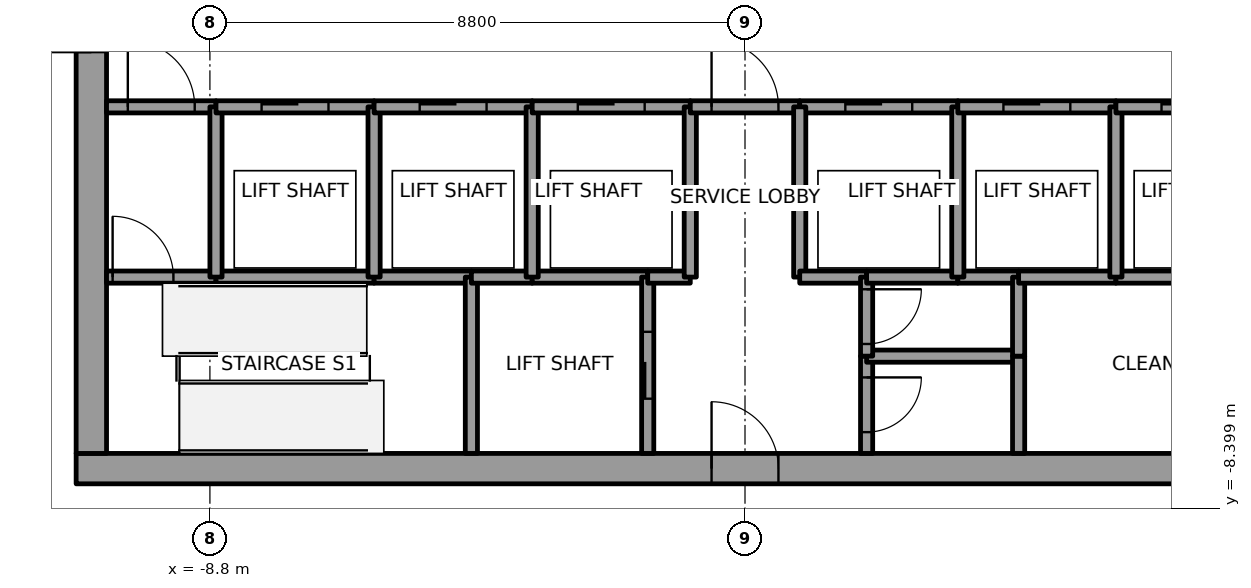
"""IFC4 building model, lengths in metres.
Left out: names, types, materials, properties, quantities, classifications, styles, units other than length and angle.
Written with IfcOpenShell. Run it as: python <this file> out.ifc"""

import sys

from ifc_helpers import new_model, si_unit, direction, frame, frame_2d, origin, place, context, subcontext, project, spatial, rectangle, extrude, element, fill, save


model = new_model("IFC4")
c1 = context("Model", 3, precision=1e-05, world=origin(), true_north=direction((0.0, 1.0)))
c2 = subcontext(c1, "Body", "Model", "MODEL_VIEW")
j1 = project(units=[si_unit("LENGTHUNIT", "METRE"), si_unit("PLANEANGLEUNIT", "RADIAN")], contexts=[c1])
p1 = place(None, origin())
s1 = spatial("IfcSite", under=j1, at=p1, CompositionType="ELEMENT")
p2 = place(p1, origin())
s2 = spatial("IfcBuilding", under=s1, at=p2, CompositionType="ELEMENT")
p3 = place(p2, frame((0.0, 0.0, 275.0)))
s3 = spatial("IfcBuildingStorey", under=s2, at=p3, CompositionType="ELEMENT", Elevation=275.0)
p4 = place(p3, frame((-11.0, -7.75, 0.0), z_axis=(0.0, 0.0, 1.0), x_axis=(1.0, 0.0, 0.0)))
e1 = element("IfcWall", 1, at=p4, inside=s3, PredefinedType="SHEAR", context=c2, shape_type="SweptSolid", body=[
    extrude(rectangle(XDim=22.0, YDim=0.5, at=frame_2d((11.0, 0.0))), origin(), (0.0, 0.0, 1.0), 4.0),
])
p5 = place(p4, frame((10.45, 0.0, 0.0)))
e2 = element("IfcOpeningElement", 2, at=p5, cuts=e1, PredefinedType="OPENING", context=c2, shape_type="SweptSolid", body=[
    extrude(rectangle(XDim=1.1, YDim=2.1, at=frame_2d((0.55, 1.05))), frame((0.0, 0.25, 0.0), z_axis=(0.0, -1.0, 0.0), x_axis=(1.0, 0.0, 0.0)), (0.0, 0.0, 1.0), 0.5),
])
p6 = place(p3, frame((-10.75, -7.5, 0.0), z_axis=(0.0, 0.0, 1.0), x_axis=(0.0, 1.0, 0.0)))
e3 = element("IfcWall", 3, at=p6, inside=s3, PredefinedType="SHEAR", context=c2, shape_type="SweptSolid", body=[
    extrude(rectangle(XDim=15.0, YDim=0.5, at=frame_2d((7.5, 0.0))), origin(), (0.0, 0.0, 1.0), 4.0),
])
p7 = place(p6, frame((6.6, 0.0, 0.0)))
e4 = element("IfcOpeningElement", 4, at=p7, cuts=e3, PredefinedType="OPENING", context=c2, shape_type="SweptSolid", body=[
    extrude(rectangle(XDim=1.8, YDim=2.1, at=frame_2d((0.9, 1.05))), frame((0.0, 0.25, 0.0), z_axis=(0.0, -1.0, 0.0), x_axis=(1.0, 0.0, 0.0)), (0.0, 0.0, 1.0), 0.5),
])
p8 = place(p3, frame((-10.5, -4.6, 0.0), z_axis=(0.0, 0.0, 1.0), x_axis=(1.0, 0.0, 0.0)))
e5 = element("IfcWall", 5, at=p8, inside=s3, PredefinedType="SOLIDWALL", context=c2, shape_type="SweptSolid", body=[
    extrude(rectangle(XDim=1.8, YDim=0.2, at=frame_2d((0.9, 0.0))), origin(), (0.0, 0.0, 1.0), 3.85),
])
p9 = place(p8, frame((0.1, 0.0, 0.0)))
e6 = element("IfcOpeningElement", 6, at=p9, cuts=e5, PredefinedType="OPENING", context=c2, shape_type="SweptSolid", body=[
    extrude(rectangle(XDim=1.0, YDim=2.1, at=frame_2d((0.5, 1.05))), frame((0.0, 0.1, 0.0), z_axis=(0.0, -1.0, 0.0), x_axis=(1.0, 0.0, 0.0)), (0.0, 0.0, 1.0), 0.2),
])
p10 = place(p3, frame((-10.5, -1.8, 0.0), z_axis=(0.0, 0.0, 1.0), x_axis=(1.0, 0.0, 0.0)))
e7 = element("IfcWall", 7, at=p10, inside=s3, PredefinedType="SOLIDWALL", context=c2, shape_type="SweptSolid", body=[
    extrude(rectangle(XDim=1.8, YDim=0.2, at=frame_2d((0.9, 0.0))), origin(), (0.0, 0.0, 1.0), 3.85),
])
p11 = place(p10, frame((0.35, 0.0, 0.0)))
e8 = element("IfcOpeningElement", 8, at=p11, cuts=e7, PredefinedType="OPENING", context=c2, shape_type="SweptSolid", body=[
    extrude(rectangle(XDim=1.1, YDim=2.1, at=frame_2d((0.55, 1.05))), frame((0.0, 0.1, 0.0), z_axis=(0.0, -1.0, 0.0), x_axis=(1.0, 0.0, 0.0)), (0.0, 0.0, 1.0), 0.2),
])
p12 = place(p3, frame((-8.7, -4.6, 0.0), z_axis=(0.0, 0.0, 1.0), x_axis=(1.0, 0.0, 0.0)))
e9 = element("IfcWall", 9, at=p12, inside=s3, PredefinedType="SOLIDWALL", context=c2, shape_type="SweptSolid", body=[
    extrude(rectangle(XDim=2.6, YDim=0.2, at=frame_2d((1.3, 0.0))), origin(), (0.0, 0.0, 1.0), 3.85),
])
p13 = place(p3, frame((-8.7, -4.6, 0.0), z_axis=(0.0, 0.0, 1.0), x_axis=(0.0, 1.0, 0.0)))
e10 = element("IfcWall", 10, at=p13, inside=s3, PredefinedType="SOLIDWALL", context=c2, shape_type="SweptSolid", body=[
    extrude(rectangle(XDim=2.8, YDim=0.2, at=frame_2d((1.4, 0.0))), origin(), (0.0, 0.0, 1.0), 3.85),
])
p14 = place(p3, frame((-8.7, -1.8, 0.0), z_axis=(0.0, 0.0, 1.0), x_axis=(1.0, 0.0, 0.0)))
e11 = element("IfcWall", 11, at=p14, inside=s3, PredefinedType="SOLIDWALL", context=c2, shape_type="SweptSolid", body=[
    extrude(rectangle(XDim=2.6, YDim=0.2, at=frame_2d((1.3, 0.0))), origin(), (0.0, 0.0, 1.0), 3.85),
])
p15 = place(p14, frame((0.75, 0.0, 0.0)))
e12 = element("IfcOpeningElement", 12, at=p15, cuts=e11, PredefinedType="OPENING", context=c2, shape_type="SweptSolid", body=[
    extrude(rectangle(XDim=1.1, YDim=2.1, at=frame_2d((0.55, 1.05))), frame((0.0, 0.1, 0.0), z_axis=(0.0, -1.0, 0.0), x_axis=(1.0, 0.0, 0.0)), (0.0, 0.0, 1.0), 0.2),
])
p16 = place(p3, frame((-6.1, -4.6, 0.0), z_axis=(0.0, 0.0, 1.0), x_axis=(1.0, 0.0, 0.0)))
e13 = element("IfcWall", 13, at=p16, inside=s3, PredefinedType="SOLIDWALL", context=c2, shape_type="SweptSolid", body=[
    extrude(rectangle(XDim=1.6, YDim=0.2, at=frame_2d((0.8, 0.0))), origin(), (0.0, 0.0, 1.0), 3.85),
])
p17 = place(p3, frame((-6.1, -4.6, 0.0), z_axis=(0.0, 0.0, 1.0), x_axis=(0.0, 1.0, 0.0)))
e14 = element("IfcWall", 14, at=p17, inside=s3, PredefinedType="SOLIDWALL", context=c2, shape_type="SweptSolid", body=[
    extrude(rectangle(XDim=2.8, YDim=0.2, at=frame_2d((1.4, 0.0))), origin(), (0.0, 0.0, 1.0), 3.85),
])
p18 = place(p3, frame((-6.1, -1.8, 0.0), z_axis=(0.0, 0.0, 1.0), x_axis=(1.0, 0.0, 0.0)))
e15 = element("IfcWall", 15, at=p18, inside=s3, PredefinedType="SOLIDWALL", context=c2, shape_type="SweptSolid", body=[
    extrude(rectangle(XDim=2.6, YDim=0.2, at=frame_2d((1.3, 0.0))), origin(), (0.0, 0.0, 1.0), 3.85),
])
p19 = place(p18, frame((0.75, 0.0, 0.0)))
e16 = element("IfcOpeningElement", 16, at=p19, cuts=e15, PredefinedType="OPENING", context=c2, shape_type="SweptSolid", body=[
    extrude(rectangle(XDim=1.1, YDim=2.1, at=frame_2d((0.55, 1.05))), frame((0.0, 0.1, 0.0), z_axis=(0.0, -1.0, 0.0), x_axis=(1.0, 0.0, 0.0)), (0.0, 0.0, 1.0), 0.2),
])
p20 = place(p3, frame((-4.5, -4.6, 0.0), z_axis=(0.0, 0.0, 1.0), x_axis=(0.0, -1.0, 0.0)))
e17 = element("IfcWall", 17, at=p20, inside=s3, PredefinedType="SOLIDWALL", context=c2, shape_type="SweptSolid", body=[
    extrude(rectangle(XDim=2.9, YDim=0.2, at=frame_2d((1.45, 0.0))), origin(), (0.0, 0.0, 1.0), 3.85),
])
p21 = place(p3, frame((-4.5, -4.6, 0.0), z_axis=(0.0, 0.0, 1.0), x_axis=(1.0, 0.0, 0.0)))
e18 = element("IfcWall", 18, at=p21, inside=s3, PredefinedType="SOLIDWALL", context=c2, shape_type="SweptSolid", body=[
    extrude(rectangle(XDim=1.0, YDim=0.2, at=frame_2d((0.5, 0.0))), origin(), (0.0, 0.0, 1.0), 3.85),
])
p22 = place(p3, frame((-3.5, -4.6, 0.0), z_axis=(0.0, 0.0, 1.0), x_axis=(1.0, 0.0, 0.0)))
e19 = element("IfcWall", 19, at=p22, inside=s3, PredefinedType="SOLIDWALL", context=c2, shape_type="SweptSolid", body=[
    extrude(rectangle(XDim=1.9, YDim=0.2, at=frame_2d((0.95, 0.0))), origin(), (0.0, 0.0, 1.0), 3.85),
])
p23 = place(p3, frame((-3.5, -4.6, 0.0), z_axis=(0.0, 0.0, 1.0), x_axis=(0.0, 1.0, 0.0)))
e20 = element("IfcWall", 20, at=p23, inside=s3, PredefinedType="SOLIDWALL", context=c2, shape_type="SweptSolid", body=[
    extrude(rectangle(XDim=2.8, YDim=0.2, at=frame_2d((1.4, 0.0))), origin(), (0.0, 0.0, 1.0), 3.85),
])
p24 = place(p3, frame((-3.5, -1.8, 0.0), z_axis=(0.0, 0.0, 1.0), x_axis=(1.0, 0.0, 0.0)))
e21 = element("IfcWall", 21, at=p24, inside=s3, PredefinedType="SOLIDWALL", context=c2, shape_type="SweptSolid", body=[
    extrude(rectangle(XDim=2.6, YDim=0.2, at=frame_2d((1.3, 0.0))), origin(), (0.0, 0.0, 1.0), 3.85),
])
p25 = place(p24, frame((0.75, 0.0, 0.0)))
e22 = element("IfcOpeningElement", 22, at=p25, cuts=e21, PredefinedType="OPENING", context=c2, shape_type="SweptSolid", body=[
    extrude(rectangle(XDim=1.1, YDim=2.1, at=frame_2d((0.55, 1.05))), frame((0.0, 0.1, 0.0), z_axis=(0.0, -1.0, 0.0), x_axis=(1.0, 0.0, 0.0)), (0.0, 0.0, 1.0), 0.2),
])
p26 = place(p3, frame((-1.6, -7.5, 0.0), z_axis=(0.0, 0.0, 1.0), x_axis=(0.0, 1.0, 0.0)))
e23 = element("IfcWall", 23, at=p26, inside=s3, PredefinedType="SOLIDWALL", context=c2, shape_type="SweptSolid", body=[
    extrude(rectangle(XDim=2.9, YDim=0.2, at=frame_2d((1.45, 0.0))), origin(), (0.0, 0.0, 1.0), 3.85),
])
p27 = place(p26, frame((0.9, 0.0, 0.0)))
e24 = element("IfcOpeningElement", 24, at=p27, cuts=e23, PredefinedType="OPENING", context=c2, shape_type="SweptSolid", body=[
    extrude(rectangle(XDim=1.1, YDim=2.1, at=frame_2d((0.55, 1.05))), frame((0.0, 0.1, 0.0), z_axis=(0.0, -1.0, 0.0), x_axis=(1.0, 0.0, 0.0)), (0.0, 0.0, 1.0), 0.2),
])
p28 = place(p3, frame((-1.6, -4.6, 0.0), z_axis=(0.0, 0.0, 1.0), x_axis=(1.0, 0.0, 0.0)))
e25 = element("IfcWall", 25, at=p28, inside=s3, PredefinedType="SOLIDWALL", context=c2, shape_type="SweptSolid", body=[
    extrude(rectangle(XDim=0.7, YDim=0.2, at=frame_2d((0.35, 0.0))), origin(), (0.0, 0.0, 1.0), 3.85),
])
p29 = place(p3, frame((-0.9, -4.6, 0.0), z_axis=(0.0, 0.0, 1.0), x_axis=(0.0, 1.0, 0.0)))
e26 = element("IfcWall", 26, at=p29, inside=s3, PredefinedType="SOLIDWALL", context=c2, shape_type="SweptSolid", body=[
    extrude(rectangle(XDim=2.8, YDim=0.2, at=frame_2d((1.4, 0.0))), origin(), (0.0, 0.0, 1.0), 3.85),
])
p30 = place(p3, frame((-0.9, -1.8, 0.0), z_axis=(0.0, 0.0, 1.0), x_axis=(1.0, 0.0, 0.0)))
e27 = element("IfcWall", 27, at=p30, inside=s3, PredefinedType="SOLIDWALL", context=c2, shape_type="SweptSolid", body=[
    extrude(rectangle(XDim=1.8, YDim=0.2, at=frame_2d((0.9, 0.0))), origin(), (0.0, 0.0, 1.0), 3.85),
])
p31 = place(p30, frame((0.35, 0.0, 0.0)))
e28 = element("IfcOpeningElement", 28, at=p31, cuts=e27, PredefinedType="OPENING", context=c2, shape_type="SweptSolid", body=[
    extrude(rectangle(XDim=1.1, YDim=2.1, at=frame_2d((0.55, 1.05))), frame((0.0, 0.1, 0.0), z_axis=(0.0, -1.0, 0.0), x_axis=(1.0, 0.0, 0.0)), (0.0, 0.0, 1.0), 0.2),
])
p32 = place(p3, frame((0.9, -1.8, 0.0), z_axis=(0.0, 0.0, 1.0), x_axis=(1.0, 0.0, 0.0)))
e29 = element("IfcWall", 29, at=p32, inside=s3, PredefinedType="SOLIDWALL", context=c2, shape_type="SweptSolid", body=[
    extrude(rectangle(XDim=2.6, YDim=0.2, at=frame_2d((1.3, 0.0))), origin(), (0.0, 0.0, 1.0), 3.85),
])
p33 = place(p32, frame((0.75, 0.0, 0.0)))
e30 = element("IfcOpeningElement", 30, at=p33, cuts=e29, PredefinedType="OPENING", context=c2, shape_type="SweptSolid", body=[
    extrude(rectangle(XDim=1.1, YDim=2.1, at=frame_2d((0.55, 1.05))), frame((0.0, 0.1, 0.0), z_axis=(0.0, -1.0, 0.0), x_axis=(1.0, 0.0, 0.0)), (0.0, 0.0, 1.0), 0.2),
])
p34 = place(p3, frame((0.9, -1.8, 0.0), z_axis=(0.0, 0.0, 1.0), x_axis=(0.0, -1.0, 0.0)))
e31 = element("IfcWall", 31, at=p34, inside=s3, PredefinedType="SOLIDWALL", context=c2, shape_type="SweptSolid", body=[
    extrude(rectangle(XDim=2.8, YDim=0.2, at=frame_2d((1.4, 0.0))), origin(), (0.0, 0.0, 1.0), 3.85),
])
p35 = place(p3, frame((0.9, -4.6, 0.0), z_axis=(0.0, 0.0, 1.0), x_axis=(1.0, 0.0, 0.0)))
e32 = element("IfcWall", 32, at=p35, inside=s3, PredefinedType="SOLIDWALL", context=c2, shape_type="SweptSolid", body=[
    extrude(rectangle(XDim=1.1, YDim=0.2, at=frame_2d((0.55, 0.0))), origin(), (0.0, 0.0, 1.0), 3.85),
])
p36 = place(p3, frame((2.0, -5.9, 0.0), z_axis=(0.0, 0.0, 1.0), x_axis=(0.0, -1.0, 0.0)))
e33 = element("IfcWall", 33, at=p36, inside=s3, PredefinedType="SOLIDWALL", context=c2, shape_type="SweptSolid", body=[
    extrude(rectangle(XDim=1.6, YDim=0.2, at=frame_2d((0.8, 0.0))), origin(), (0.0, 0.0, 1.0), 3.85),
])
p37 = place(p36, frame((0.35, 0.0, 0.0)))
e34 = element("IfcOpeningElement", 34, at=p37, cuts=e33, PredefinedType="OPENING", context=c2, shape_type="SweptSolid", body=[
    extrude(rectangle(XDim=0.9, YDim=2.1, at=frame_2d((0.45, 1.05))), frame((0.0, 0.1, 0.0), z_axis=(0.0, -1.0, 0.0), x_axis=(1.0, 0.0, 0.0)), (0.0, 0.0, 1.0), 0.2),
])
p38 = place(p3, frame((4.5, -5.9, 0.0), z_axis=(0.0, 0.0, 1.0), x_axis=(-1.0, 0.0, 0.0)))
e35 = element("IfcWall", 35, at=p38, inside=s3, PredefinedType="SOLIDWALL", context=c2, shape_type="SweptSolid", body=[
    extrude(rectangle(XDim=2.5, YDim=0.2, at=frame_2d((1.25, 0.0))), origin(), (0.0, 0.0, 1.0), 3.85),
])
p39 = place(p3, frame((2.0, -4.6, 0.0), z_axis=(0.0, 0.0, 1.0), x_axis=(0.0, -1.0, 0.0)))
e36 = element("IfcWall", 36, at=p39, inside=s3, PredefinedType="SOLIDWALL", context=c2, shape_type="SweptSolid", body=[
    extrude(rectangle(XDim=1.3, YDim=0.2, at=frame_2d((0.65, 0.0))), origin(), (0.0, 0.0, 1.0), 3.85),
])
p40 = place(p39, frame((0.2, 0.0, 0.0)))
e37 = element("IfcOpeningElement", 37, at=p40, cuts=e36, PredefinedType="OPENING", context=c2, shape_type="SweptSolid", body=[
    extrude(rectangle(XDim=0.9, YDim=2.1, at=frame_2d((0.45, 1.05))), frame((0.0, 0.1, 0.0), z_axis=(0.0, -1.0, 0.0), x_axis=(1.0, 0.0, 0.0)), (0.0, 0.0, 1.0), 0.2),
])
p41 = place(p3, frame((3.5, -4.6, 0.0), z_axis=(0.0, 0.0, 1.0), x_axis=(-1.0, 0.0, 0.0)))
e38 = element("IfcWall", 38, at=p41, inside=s3, PredefinedType="SOLIDWALL", context=c2, shape_type="SweptSolid", body=[
    extrude(rectangle(XDim=1.5, YDim=0.2, at=frame_2d((0.75, 0.0))), origin(), (0.0, 0.0, 1.0), 3.85),
])
p42 = place(p3, frame((4.5, -4.6, 0.0), z_axis=(0.0, 0.0, 1.0), x_axis=(-1.0, 0.0, 0.0)))
e39 = element("IfcWall", 39, at=p42, inside=s3, PredefinedType="SOLIDWALL", context=c2, shape_type="SweptSolid", body=[
    extrude(rectangle(XDim=1.0, YDim=0.2, at=frame_2d((0.5, 0.0))), origin(), (0.0, 0.0, 1.0), 3.85),
])
p43 = place(p3, frame((3.5, -4.6, 0.0), z_axis=(0.0, 0.0, 1.0), x_axis=(0.0, 1.0, 0.0)))
e40 = element("IfcWall", 40, at=p43, inside=s3, PredefinedType="SOLIDWALL", context=c2, shape_type="SweptSolid", body=[
    extrude(rectangle(XDim=2.8, YDim=0.2, at=frame_2d((1.4, 0.0))), origin(), (0.0, 0.0, 1.0), 3.85),
])
p44 = place(p3, frame((3.5, -1.8, 0.0), z_axis=(0.0, 0.0, 1.0), x_axis=(1.0, 0.0, 0.0)))
e41 = element("IfcWall", 41, at=p44, inside=s3, PredefinedType="SOLIDWALL", context=c2, shape_type="SweptSolid", body=[
    extrude(rectangle(XDim=2.6, YDim=0.2, at=frame_2d((1.3, 0.0))), origin(), (0.0, 0.0, 1.0), 3.85),
])
p45 = place(p44, frame((0.75, 0.0, 0.0)))
e42 = element("IfcOpeningElement", 42, at=p45, cuts=e41, PredefinedType="OPENING", context=c2, shape_type="SweptSolid", body=[
    extrude(rectangle(XDim=1.1, YDim=2.1, at=frame_2d((0.55, 1.05))), frame((0.0, 0.1, 0.0), z_axis=(0.0, -1.0, 0.0), x_axis=(1.0, 0.0, 0.0)), (0.0, 0.0, 1.0), 0.2),
])
p46 = place(p3, frame((4.5, -5.9, 0.0), z_axis=(0.0, 0.0, 1.0), x_axis=(0.0, -1.0, 0.0)))
e43 = element("IfcWall", 43, at=p46, inside=s3, PredefinedType="SOLIDWALL", context=c2, shape_type="SweptSolid", body=[
    extrude(rectangle(XDim=1.6, YDim=0.2, at=frame_2d((0.8, 0.0))), origin(), (0.0, 0.0, 1.0), 3.85),
])
p47 = place(p3, frame((4.5, -4.6, 0.0), z_axis=(0.0, 0.0, 1.0), x_axis=(0.0, -1.0, 0.0)))
e44 = element("IfcWall", 44, at=p47, inside=s3, PredefinedType="SOLIDWALL", context=c2, shape_type="SweptSolid", body=[
    extrude(rectangle(XDim=1.3, YDim=0.2, at=frame_2d((0.65, 0.0))), origin(), (0.0, 0.0, 1.0), 3.85),
])
p48 = place(p3, frame((6.1, -4.6, 0.0), z_axis=(0.0, 0.0, 1.0), x_axis=(-1.0, 0.0, 0.0)))
e45 = element("IfcWall", 45, at=p48, inside=s3, PredefinedType="SOLIDWALL", context=c2, shape_type="SweptSolid", body=[
    extrude(rectangle(XDim=1.6, YDim=0.2, at=frame_2d((0.8, 0.0))), origin(), (0.0, 0.0, 1.0), 3.85),
])
p49 = place(p3, frame((8.7, -4.6, 0.0), z_axis=(0.0, 0.0, 1.0), x_axis=(-1.0, 0.0, 0.0)))
e46 = element("IfcWall", 46, at=p49, inside=s3, PredefinedType="SOLIDWALL", context=c2, shape_type="SweptSolid", body=[
    extrude(rectangle(XDim=2.6, YDim=0.2, at=frame_2d((1.3, 0.0))), origin(), (0.0, 0.0, 1.0), 3.85),
])
p50 = place(p3, frame((6.1, -4.6, 0.0), z_axis=(0.0, 0.0, 1.0), x_axis=(0.0, 1.0, 0.0)))
e47 = element("IfcWall", 47, at=p50, inside=s3, PredefinedType="SOLIDWALL", context=c2, shape_type="SweptSolid", body=[
    extrude(rectangle(XDim=2.8, YDim=0.2, at=frame_2d((1.4, 0.0))), origin(), (0.0, 0.0, 1.0), 3.85),
])
p51 = place(p3, frame((6.1, -1.8, 0.0), z_axis=(0.0, 0.0, 1.0), x_axis=(1.0, 0.0, 0.0)))
e48 = element("IfcWall", 48, at=p51, inside=s3, PredefinedType="SOLIDWALL", context=c2, shape_type="SweptSolid", body=[
    extrude(rectangle(XDim=2.6, YDim=0.2, at=frame_2d((1.3, 0.0))), origin(), (0.0, 0.0, 1.0), 3.85),
])
p52 = place(p51, frame((0.75, 0.0, 0.0)))
e49 = element("IfcOpeningElement", 49, at=p52, cuts=e48, PredefinedType="OPENING", context=c2, shape_type="SweptSolid", body=[
    extrude(rectangle(XDim=1.1, YDim=2.1, at=frame_2d((0.55, 1.05))), frame((0.0, 0.1, 0.0), z_axis=(0.0, -1.0, 0.0), x_axis=(1.0, 0.0, 0.0)), (0.0, 0.0, 1.0), 0.2),
])
p53 = place(p15, origin())
e50 = element("IfcDoor", 50, at=p53, inside=s3, OperationType="SLIDING_TO_LEFT", PredefinedType="DOOR", context=c2, shape_type="SweptSolid", body=[
    extrude(rectangle(XDim=1.1, YDim=2.1, at=frame_2d((0.55, 1.05))), frame((0.0, 0.025, 0.0), z_axis=(0.0, -1.0, 0.0), x_axis=(1.0, 0.0, 0.0)), (0.0, 0.0, 1.0), 0.05),
])
fill(e12, e50)
p54 = place(p19, origin())
e51 = element("IfcDoor", 51, at=p54, inside=s3, OperationType="SLIDING_TO_LEFT", PredefinedType="DOOR", context=c2, shape_type="SweptSolid", body=[
    extrude(rectangle(XDim=1.1, YDim=2.1, at=frame_2d((0.55, 1.05))), frame((0.0, 0.025, 0.0), z_axis=(0.0, -1.0, 0.0), x_axis=(1.0, 0.0, 0.0)), (0.0, 0.0, 1.0), 0.05),
])
fill(e16, e51)
p55 = place(p25, origin())
e52 = element("IfcDoor", 52, at=p55, inside=s3, OperationType="SLIDING_TO_RIGHT", PredefinedType="DOOR", context=c2, shape_type="SweptSolid", body=[
    extrude(rectangle(XDim=1.1, YDim=2.1, at=frame_2d((0.55, 1.05))), frame((0.0, 0.025, 0.0), z_axis=(0.0, -1.0, 0.0), x_axis=(1.0, 0.0, 0.0)), (0.0, 0.0, 1.0), 0.05),
])
fill(e22, e52)
p56 = place(p33, origin())
e53 = element("IfcDoor", 53, at=p56, inside=s3, OperationType="SLIDING_TO_RIGHT", PredefinedType="DOOR", context=c2, shape_type="SweptSolid", body=[
    extrude(rectangle(XDim=1.1, YDim=2.1, at=frame_2d((0.55, 1.05))), frame((0.0, 0.025, 0.0), z_axis=(0.0, -1.0, 0.0), x_axis=(1.0, 0.0, 0.0)), (0.0, 0.0, 1.0), 0.05),
])
fill(e30, e53)
p57 = place(p45, origin())
e54 = element("IfcDoor", 54, at=p57, inside=s3, OperationType="SLIDING_TO_LEFT", PredefinedType="DOOR", context=c2, shape_type="SweptSolid", body=[
    extrude(rectangle(XDim=1.1, YDim=2.1, at=frame_2d((0.55, 1.05))), frame((0.0, 0.025, 0.0), z_axis=(0.0, -1.0, 0.0), x_axis=(1.0, 0.0, 0.0)), (0.0, 0.0, 1.0), 0.05),
])
fill(e42, e54)
p58 = place(p52, origin())
e55 = element("IfcDoor", 55, at=p58, inside=s3, OperationType="SLIDING_TO_LEFT", PredefinedType="DOOR", context=c2, shape_type="SweptSolid", body=[
    extrude(rectangle(XDim=1.1, YDim=2.1, at=frame_2d((0.55, 1.05))), frame((0.0, 0.025, 0.0), z_axis=(0.0, -1.0, 0.0), x_axis=(1.0, 0.0, 0.0)), (0.0, 0.0, 1.0), 0.05),
])
fill(e49, e55)
p59 = place(p27, origin())
e56 = element("IfcDoor", 56, at=p59, inside=s3, OperationType="SLIDING_TO_LEFT", PredefinedType="DOOR", context=c2, shape_type="SweptSolid", body=[
    extrude(rectangle(XDim=1.1, YDim=2.1, at=frame_2d((0.55, 1.05))), frame((0.0, 0.025, 0.0), z_axis=(0.0, -1.0, 0.0), x_axis=(1.0, 0.0, 0.0)), (0.0, 0.0, 1.0), 0.05),
])
fill(e24, e56)
p60 = place(p11, origin())
e57 = element("IfcDoor", 57, at=p60, inside=s3, OperationType="SINGLE_SWING_LEFT", PredefinedType="DOOR", context=c2, shape_type="SweptSolid", body=[
    extrude(rectangle(XDim=1.1, YDim=2.1, at=frame_2d((0.55, 1.05))), frame((0.0, 0.025, 0.0), z_axis=(0.0, -1.0, 0.0), x_axis=(1.0, 0.0, 0.0)), (0.0, 0.0, 1.0), 0.05),
])
fill(e8, e57)
p61 = place(p31, origin())
e58 = element("IfcDoor", 58, at=p61, inside=s3, OperationType="SINGLE_SWING_LEFT", PredefinedType="DOOR", context=c2, shape_type="SweptSolid", body=[
    extrude(rectangle(XDim=1.1, YDim=2.1, at=frame_2d((0.55, 1.05))), frame((0.0, 0.025, 0.0), z_axis=(0.0, -1.0, 0.0), x_axis=(1.0, 0.0, 0.0)), (0.0, 0.0, 1.0), 0.05),
])
fill(e28, e58)
p62 = place(p9, origin())
e59 = element("IfcDoor", 59, at=p62, inside=s3, OperationType="SINGLE_SWING_LEFT", PredefinedType="DOOR", context=c2, shape_type="SweptSolid", body=[
    extrude(rectangle(XDim=1.0, YDim=2.1, at=frame_2d((0.5, 1.05))), frame((0.0, 0.025, 0.0), z_axis=(0.0, -1.0, 0.0), x_axis=(1.0, 0.0, 0.0)), (0.0, 0.0, 1.0), 0.05),
])
fill(e6, e59)
p63 = place(p37, origin())
e60 = element("IfcDoor", 60, at=p63, inside=s3, OperationType="SINGLE_SWING_RIGHT", PredefinedType="DOOR", context=c2, shape_type="SweptSolid", body=[
    extrude(rectangle(XDim=0.9, YDim=2.1, at=frame_2d((0.45, 1.05))), frame((0.0, 0.025, 0.0), z_axis=(0.0, -1.0, 0.0), x_axis=(1.0, 0.0, 0.0)), (0.0, 0.0, 1.0), 0.05),
])
fill(e34, e60)
p64 = place(p40, origin())
e61 = element("IfcDoor", 61, at=p64, inside=s3, OperationType="SINGLE_SWING_RIGHT", PredefinedType="DOOR", context=c2, shape_type="SweptSolid", body=[
    extrude(rectangle(XDim=0.9, YDim=2.1, at=frame_2d((0.45, 1.05))), frame((0.0, 0.025, 0.0), z_axis=(0.0, -1.0, 0.0), x_axis=(1.0, 0.0, 0.0)), (0.0, 0.0, 1.0), 0.05),
])
fill(e37, e61)
p65 = place(p7, origin())
e62 = element("IfcDoor", 62, at=p65, inside=s3, OperationType="DOUBLE_DOOR_SINGLE_SWING", PredefinedType="DOOR", context=c2, shape_type="SweptSolid", body=[
    extrude(rectangle(XDim=1.8, YDim=2.1, at=frame_2d((0.9, 1.05))), frame((0.0, 0.025, 0.0), z_axis=(0.0, -1.0, 0.0), x_axis=(1.0, 0.0, 0.0)), (0.0, 0.0, 1.0), 0.05),
])
fill(e4, e62)
p66 = place(p5, origin())
e63 = element("IfcDoor", 63, at=p66, inside=s3, OperationType="SINGLE_SWING_RIGHT", PredefinedType="DOOR", context=c2, shape_type="SweptSolid", body=[
    extrude(rectangle(XDim=1.1, YDim=2.1, at=frame_2d((0.55, 1.05))), frame((0.0, 0.025, 0.0), z_axis=(0.0, -1.0, 0.0), x_axis=(1.0, 0.0, 0.0)), (0.0, 0.0, 1.0), 0.05),
])
fill(e2, e63)
save(model, sys.argv[1])
